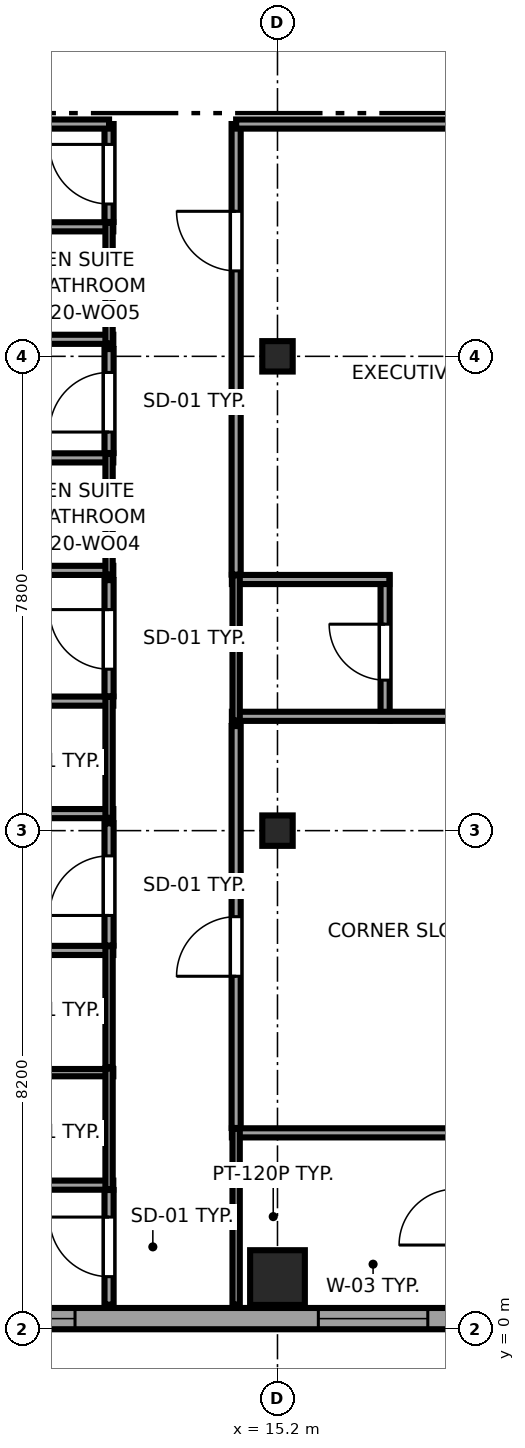
"""IFC4 building model, lengths in metres.
Left out: names, types, materials, properties, quantities, classifications, styles, units other than length and angle.
Written with IfcOpenShell. Run it as: python <this file> out.ifc"""

import sys

from ifc_helpers import new_model, si_unit, direction, frame, frame_2d, origin, origin_2d, place, context, subcontext, project, spatial, rectangle, i_section, extrude, source, transform, mapped, element, fill, save


model = new_model("IFC4")
c1 = context("Model", 3, precision=1e-05, world=origin(), true_north=direction((0.0, 1.0)))
c2 = subcontext(c1, "Body", "Model", "MODEL_VIEW")
j1 = project(units=[si_unit("LENGTHUNIT", "METRE"), si_unit("PLANEANGLEUNIT", "RADIAN")], contexts=[c1])
p1 = place(None, origin())
s1 = spatial("IfcSite", under=j1, at=p1, CompositionType="ELEMENT")
p2 = place(p1, origin())
s2 = spatial("IfcBuilding", under=s1, at=p2, CompositionType="ELEMENT")
p3 = place(p2, frame((0.0, 0.0, 81.7)))
s3 = spatial("IfcBuildingStorey", under=s2, at=p3, CompositionType="ELEMENT", Elevation=81.7)
m1 = source(origin(), c2, "Body", "SweptSolid", [
    extrude(rectangle(XDim=0.9, YDim=0.9, at=origin_2d()), origin(), (0.0, 0.0, 1.0), 3.55),
])
p4 = place(p3, frame((15.2, 0.85, 0.0), z_axis=(0.0, 0.0, 1.0), x_axis=(1.0, 0.0, 0.0)))
e1 = element("IfcColumn", 1, at=p4, inside=s3, PredefinedType="COLUMN", context=c2, shape_type="MappedRepresentation", body=[
    mapped(m1, transform((0.0, 0.0, 0.0), x_axis=(1.0, 0.0, 0.0), y_axis=(0.0, 1.0, 0.0), z_axis=(0.0, 0.0, 1.0), scale=1.0)),
])
m2 = source(origin(), c2, "Body", "SweptSolid", [
    extrude(i_section(OverallWidth=0.5, OverallDepth=0.5, WebThickness=0.022, FlangeThickness=0.034, at=origin_2d()), origin(), (0.0, 0.0, 1.0), 3.55),
])
for number, where, z_axis, x_axis in (
    (2, (15.2, 8.2, 0.0), (0.0, 0.0, 1.0), (1.0, 0.0, 0.0)),
    (3, (15.2, 16.0, 0.0), (0.0, 0.0, 1.0), (1.0, 0.0, 0.0)),
):
    element("IfcColumn", number, at=place(p3, frame(where, z_axis=z_axis, x_axis=x_axis)), inside=s3, PredefinedType="COLUMN", context=c2, shape_type="MappedRepresentation", body=[
        mapped(m2, transform((0.0, 0.0, 0.0), x_axis=(1.0, 0.0, 0.0), y_axis=(0.0, 1.0, 0.0), z_axis=(0.0, 0.0, 1.0), scale=1.0)),
    ])
p5 = place(p3, frame((4.617, 0.175, 0.0), z_axis=(0.0, 0.0, 1.0), x_axis=(1.0, 0.0, 0.0)))
e4 = element("IfcWall", 4, at=p5, inside=s3, PredefinedType="SOLIDWALL", context=c2, shape_type="SweptSolid", body=[
    extrude(rectangle(XDim=18.008, YDim=0.35, at=frame_2d((9.004, 0.0))), origin(), (0.0, 0.0, 1.0), 3.37),
])
p6 = place(p5, frame((5.453, 0.0, 0.68)))
e5 = element("IfcOpeningElement", 5, at=p6, cuts=e4, PredefinedType="OPENING", context=c2, shape_type="SweptSolid", body=[
    extrude(rectangle(XDim=1.8, YDim=1.85, at=frame_2d((0.9, 0.925))), frame((0.0, 0.185, 0.0), z_axis=(0.0, -1.0, 0.0), x_axis=(1.0, 0.0, 0.0)), (0.0, 0.0, 1.0), 0.37),
])
p7 = place(p5, frame((11.255, 0.0, 0.68)))
e6 = element("IfcOpeningElement", 6, at=p7, cuts=e4, PredefinedType="OPENING", context=c2, shape_type="SweptSolid", body=[
    extrude(rectangle(XDim=1.8, YDim=1.85, at=frame_2d((0.9, 0.925))), frame((0.0, 0.185, 0.0), z_axis=(0.0, -1.0, 0.0), x_axis=(1.0, 0.0, 0.0)), (0.0, 0.0, 1.0), 0.37),
])
p8 = place(p5, frame((14.407, 0.0, 0.68)))
e7 = element("IfcOpeningElement", 7, at=p8, cuts=e4, PredefinedType="OPENING", context=c2, shape_type="SweptSolid", body=[
    extrude(rectangle(XDim=1.8, YDim=1.85, at=frame_2d((0.9, 0.925))), frame((0.0, 0.185, 0.0), z_axis=(0.0, -1.0, 0.0), x_axis=(1.0, 0.0, 0.0)), (0.0, 0.0, 1.0), 0.37),
])
p9 = place(p3, frame((9.91, 2.37, 0.0), z_axis=(0.0, 0.0, 1.0), x_axis=(1.0, 0.0, 0.0)))
e8 = element("IfcWall", 8, at=p9, inside=s3, PredefinedType="PARTITIONING", context=c2, shape_type="SweptSolid", body=[
    extrude(rectangle(XDim=2.59, YDim=0.15, at=frame_2d((1.295, 0.0))), origin(), (0.0, 0.0, 1.0), 3.37),
])
p10 = place(p3, frame((9.91, 4.22, 0.0), z_axis=(0.0, 0.0, 1.0), x_axis=(1.0, 0.0, 0.0)))
e9 = element("IfcWall", 9, at=p10, inside=s3, PredefinedType="PLUMBINGWALL", context=c2, shape_type="SweptSolid", body=[
    extrude(rectangle(XDim=2.59, YDim=0.12, at=frame_2d((1.295, 0.0))), origin(), (0.0, 0.0, 1.0), 3.37),
])
p11 = place(p3, frame((12.43, 2.3, 0.0), z_axis=(0.0, 0.0, 1.0), x_axis=(0.0, 1.0, 0.0)))
e10 = element("IfcWall", 10, at=p11, inside=s3, PredefinedType="PLUMBINGWALL", context=c2, shape_type="SweptSolid", body=[
    extrude(rectangle(XDim=1.99, YDim=0.12, at=frame_2d((0.995, 0.0))), origin(), (0.0, 0.0, 1.0), 3.37),
])
p12 = place(p3, frame((9.91, 6.23, 0.0), z_axis=(0.0, 0.0, 1.0), x_axis=(1.0, 0.0, 0.0)))
e11 = element("IfcWall", 11, at=p12, inside=s3, PredefinedType="PARTITIONING", context=c2, shape_type="SweptSolid", body=[
    extrude(rectangle(XDim=2.59, YDim=0.15, at=frame_2d((1.295, 0.0))), origin(), (0.0, 0.0, 1.0), 3.37),
])
p13 = place(p3, frame((12.43, 4.31, 0.0), z_axis=(0.0, 0.0, 1.0), x_axis=(0.0, 1.0, 0.0)))
e12 = element("IfcWall", 12, at=p13, inside=s3, PredefinedType="PLUMBINGWALL", context=c2, shape_type="SweptSolid", body=[
    extrude(rectangle(XDim=1.99, YDim=0.12, at=frame_2d((0.995, 0.0))), origin(), (0.0, 0.0, 1.0), 3.37),
])
p14 = place(p3, frame((0.405, 8.48, 0.0), z_axis=(0.0, 0.0, 1.0), x_axis=(1.0, 0.0, 0.0)))
e13 = element("IfcWall", 13, at=p14, inside=s3, PredefinedType="PARTITIONING", context=c2, shape_type="SweptSolid", body=[
    extrude(rectangle(XDim=12.095, YDim=0.15, at=frame_2d((6.047, 0.0))), origin(), (0.0, 0.0, 1.0), 3.37),
])
p15 = place(p3, frame((9.91, 10.33, 0.0), z_axis=(0.0, 0.0, 1.0), x_axis=(1.0, 0.0, 0.0)))
e14 = element("IfcWall", 14, at=p15, inside=s3, PredefinedType="PARTITIONING", context=c2, shape_type="SweptSolid", body=[
    extrude(rectangle(XDim=2.59, YDim=0.15, at=frame_2d((1.295, 0.0))), origin(), (0.0, 0.0, 1.0), 3.37),
])
p16 = place(p3, frame((12.43, 8.41, 0.0), z_axis=(0.0, 0.0, 1.0), x_axis=(0.0, 1.0, 0.0)))
e15 = element("IfcWall", 15, at=p16, inside=s3, PredefinedType="PLUMBINGWALL", context=c2, shape_type="SweptSolid", body=[
    extrude(rectangle(XDim=1.99, YDim=0.12, at=frame_2d((0.995, 0.0))), origin(), (0.0, 0.0, 1.0), 3.37),
])
p17 = place(p3, frame((0.405, 12.48, 0.0), z_axis=(0.0, 0.0, 1.0), x_axis=(1.0, 0.0, 0.0)))
e16 = element("IfcWall", 16, at=p17, inside=s3, PredefinedType="PARTITIONING", context=c2, shape_type="SweptSolid", body=[
    extrude(rectangle(XDim=12.095, YDim=0.15, at=frame_2d((6.047, 0.0))), origin(), (0.0, 0.0, 1.0), 3.37),
])
p18 = place(p3, frame((9.91, 14.33, 0.0), z_axis=(0.0, 0.0, 1.0), x_axis=(1.0, 0.0, 0.0)))
e17 = element("IfcWall", 17, at=p18, inside=s3, PredefinedType="PARTITIONING", context=c2, shape_type="SweptSolid", body=[
    extrude(rectangle(XDim=2.59, YDim=0.15, at=frame_2d((1.295, 0.0))), origin(), (0.0, 0.0, 1.0), 3.37),
])
p19 = place(p3, frame((12.43, 12.41, 0.0), z_axis=(0.0, 0.0, 1.0), x_axis=(0.0, 1.0, 0.0)))
e18 = element("IfcWall", 18, at=p19, inside=s3, PredefinedType="PLUMBINGWALL", context=c2, shape_type="SweptSolid", body=[
    extrude(rectangle(XDim=1.99, YDim=0.12, at=frame_2d((0.995, 0.0))), origin(), (0.0, 0.0, 1.0), 3.37),
])
p20 = place(p3, frame((0.405, 16.28, 0.0), z_axis=(0.0, 0.0, 1.0), x_axis=(1.0, 0.0, 0.0)))
e19 = element("IfcWall", 19, at=p20, inside=s3, PredefinedType="PARTITIONING", context=c2, shape_type="SweptSolid", body=[
    extrude(rectangle(XDim=12.095, YDim=0.15, at=frame_2d((6.047, 0.0))), origin(), (0.0, 0.0, 1.0), 3.37),
])
p21 = place(p3, frame((9.91, 18.13, 0.0), z_axis=(0.0, 0.0, 1.0), x_axis=(1.0, 0.0, 0.0)))
e20 = element("IfcWall", 20, at=p21, inside=s3, PredefinedType="PARTITIONING", context=c2, shape_type="SweptSolid", body=[
    extrude(rectangle(XDim=2.59, YDim=0.15, at=frame_2d((1.295, 0.0))), origin(), (0.0, 0.0, 1.0), 3.37),
])
p22 = place(p3, frame((12.43, 16.21, 0.0), z_axis=(0.0, 0.0, 1.0), x_axis=(0.0, 1.0, 0.0)))
e21 = element("IfcWall", 21, at=p22, inside=s3, PredefinedType="PLUMBINGWALL", context=c2, shape_type="SweptSolid", body=[
    extrude(rectangle(XDim=1.99, YDim=0.12, at=frame_2d((0.995, 0.0))), origin(), (0.0, 0.0, 1.0), 3.37),
])
p23 = place(p3, frame((14.45, 3.23, 0.0), z_axis=(0.0, 0.0, 1.0), x_axis=(1.0, 0.0, 0.0)))
e22 = element("IfcWall", 22, at=p23, inside=s3, PredefinedType="PARTITIONING", context=c2, shape_type="SweptSolid", body=[
    extrude(rectangle(XDim=3.74, YDim=0.15, at=frame_2d((1.87, 0.0))), origin(), (0.0, 0.0, 1.0), 3.37),
])
p24 = place(p3, frame((14.52, 0.405, 0.0), z_axis=(0.0, 0.0, 1.0), x_axis=(0.0, 1.0, 0.0)))
e23 = element("IfcWall", 23, at=p24, inside=s3, PredefinedType="PLUMBINGWALL", context=c2, shape_type="SweptSolid", body=[
    extrude(rectangle(XDim=2.895, YDim=0.12, at=frame_2d((1.448, 0.0))), origin(), (0.0, 0.0, 1.0), 3.37),
])
p25 = place(p3, frame((16.97, 10.01, 0.0), z_axis=(0.0, 0.0, 1.0), x_axis=(0.0, 1.0, 0.0)))
e24 = element("IfcWall", 24, at=p25, inside=s3, PredefinedType="PARTITIONING", context=c2, shape_type="SweptSolid", body=[
    extrude(rectangle(XDim=2.39, YDim=0.15, at=frame_2d((1.195, 0.0))), origin(), (0.0, 0.0, 1.0), 3.37),
])
p26 = place(p25, frame((0.665, 0.0, 0.0)))
e25 = element("IfcOpeningElement", 25, at=p26, cuts=e24, PredefinedType="OPENING", context=c2, shape_type="SweptSolid", body=[
    extrude(rectangle(XDim=0.92, YDim=2.01, at=frame_2d((0.46, 1.005))), frame((0.0, 0.085, 0.0), z_axis=(0.0, -1.0, 0.0), x_axis=(1.0, 0.0, 0.0)), (0.0, 0.0, 1.0), 0.17),
])
p27 = place(p3, frame((14.45, 10.08, 0.0), z_axis=(0.0, 0.0, 1.0), x_axis=(1.0, 0.0, 0.0)))
e26 = element("IfcWall", 26, at=p27, inside=s3, PredefinedType="PARTITIONING", context=c2, shape_type="SweptSolid", body=[
    extrude(rectangle(XDim=7.9, YDim=0.15, at=frame_2d((3.95, 0.0))), origin(), (0.0, 0.0, 1.0), 3.37),
])
p28 = place(p3, frame((14.45, 12.33, 0.0), z_axis=(0.0, 0.0, 1.0), x_axis=(1.0, 0.0, 0.0)))
e27 = element("IfcWall", 27, at=p28, inside=s3, PredefinedType="PARTITIONING", context=c2, shape_type="SweptSolid", body=[
    extrude(rectangle(XDim=2.59, YDim=0.15, at=frame_2d((1.295, 0.0))), origin(), (0.0, 0.0, 1.0), 3.37),
])
p29 = place(p3, frame((14.52, 10.01, 0.0), z_axis=(0.0, 0.0, 1.0), x_axis=(0.0, 1.0, 0.0)))
e28 = element("IfcWall", 28, at=p29, inside=s3, PredefinedType="PLUMBINGWALL", context=c2, shape_type="SweptSolid", body=[
    extrude(rectangle(XDim=2.39, YDim=0.12, at=frame_2d((1.195, 0.0))), origin(), (0.0, 0.0, 1.0), 3.37),
])
p30 = place(p3, frame((12.43, 0.405, 0.0), z_axis=(0.0, 0.0, 1.0), x_axis=(0.0, 1.0, 0.0)))
e29 = element("IfcWall", 29, at=p30, inside=s3, PredefinedType="PARTITIONING", context=c2, shape_type="SweptSolid", body=[
    extrude(rectangle(XDim=1.885, YDim=0.15, at=frame_2d((0.942, 0.0))), origin(), (0.0, 0.0, 1.0), 3.37),
])
p31 = place(p30, frame((0.46, 0.0, 0.0)))
e30 = element("IfcOpeningElement", 30, at=p31, cuts=e29, PredefinedType="OPENING", context=c2, shape_type="SweptSolid", body=[
    extrude(rectangle(XDim=0.98, YDim=2.12, at=frame_2d((0.49, 1.06))), frame((0.0, 0.085, 0.0), z_axis=(0.0, -1.0, 0.0), x_axis=(1.0, 0.0, 0.0)), (0.0, 0.0, 1.0), 0.17),
])
p32 = place(p3, frame((12.43, 6.31, 0.0), z_axis=(0.0, 0.0, 1.0), x_axis=(0.0, 1.0, 0.0)))
e31 = element("IfcWall", 31, at=p32, inside=s3, PredefinedType="PARTITIONING", context=c2, shape_type="SweptSolid", body=[
    extrude(rectangle(XDim=2.01, YDim=0.15, at=frame_2d((1.005, 0.0))), origin(), (0.0, 0.0, 1.0), 3.37),
])
p33 = place(p32, frame((0.495, 0.0, 0.0)))
e32 = element("IfcOpeningElement", 32, at=p33, cuts=e31, PredefinedType="OPENING", context=c2, shape_type="SweptSolid", body=[
    extrude(rectangle(XDim=0.98, YDim=2.12, at=frame_2d((0.49, 1.06))), frame((0.0, 0.085, 0.0), z_axis=(0.0, -1.0, 0.0), x_axis=(1.0, 0.0, 0.0)), (0.0, 0.0, 1.0), 0.17),
])
p34 = place(p3, frame((12.43, 10.41, 0.0), z_axis=(0.0, 0.0, 1.0), x_axis=(0.0, 1.0, 0.0)))
e33 = element("IfcWall", 33, at=p34, inside=s3, PredefinedType="PARTITIONING", context=c2, shape_type="SweptSolid", body=[
    extrude(rectangle(XDim=1.91, YDim=0.15, at=frame_2d((0.955, 0.0))), origin(), (0.0, 0.0, 1.0), 3.37),
])
p35 = place(p34, frame((0.445, 0.0, 0.0)))
e34 = element("IfcOpeningElement", 34, at=p35, cuts=e33, PredefinedType="OPENING", context=c2, shape_type="SweptSolid", body=[
    extrude(rectangle(XDim=0.98, YDim=2.12, at=frame_2d((0.49, 1.06))), frame((0.0, 0.085, 0.0), z_axis=(0.0, -1.0, 0.0), x_axis=(1.0, 0.0, 0.0)), (0.0, 0.0, 1.0), 0.17),
])
p36 = place(p3, frame((12.43, 14.41, 0.0), z_axis=(0.0, 0.0, 1.0), x_axis=(0.0, 1.0, 0.0)))
e35 = element("IfcWall", 35, at=p36, inside=s3, PredefinedType="PARTITIONING", context=c2, shape_type="SweptSolid", body=[
    extrude(rectangle(XDim=1.71, YDim=0.15, at=frame_2d((0.855, 0.0))), origin(), (0.0, 0.0, 1.0), 3.37),
])
p37 = place(p36, frame((0.345, 0.0, 0.0)))
e36 = element("IfcOpeningElement", 36, at=p37, cuts=e35, PredefinedType="OPENING", context=c2, shape_type="SweptSolid", body=[
    extrude(rectangle(XDim=0.98, YDim=2.12, at=frame_2d((0.49, 1.06))), frame((0.0, 0.085, 0.0), z_axis=(0.0, -1.0, 0.0), x_axis=(1.0, 0.0, 0.0)), (0.0, 0.0, 1.0), 0.17),
])
p38 = place(p3, frame((12.43, 18.21, 0.0), z_axis=(0.0, 0.0, 1.0), x_axis=(0.0, 1.0, 0.0)))
e37 = element("IfcWall", 37, at=p38, inside=s3, PredefinedType="PARTITIONING", context=c2, shape_type="SweptSolid", body=[
    extrude(rectangle(XDim=1.61, YDim=0.15, at=frame_2d((0.805, 0.0))), origin(), (0.0, 0.0, 1.0), 3.37),
])
p39 = place(p38, frame((0.295, 0.0, 0.0)))
e38 = element("IfcOpeningElement", 38, at=p39, cuts=e37, PredefinedType="OPENING", context=c2, shape_type="SweptSolid", body=[
    extrude(rectangle(XDim=0.98, YDim=2.12, at=frame_2d((0.49, 1.06))), frame((0.0, 0.085, 0.0), z_axis=(0.0, -1.0, 0.0), x_axis=(1.0, 0.0, 0.0)), (0.0, 0.0, 1.0), 0.17),
])
p40 = place(p3, frame((0.405, 19.82, 0.0), z_axis=(0.0, 0.0, 1.0), x_axis=(1.0, 0.0, 0.0)))
e39 = element("IfcWall", 39, at=p40, inside=s3, PredefinedType="PARTITIONING", context=c2, shape_type="SweptSolid", body=[
    extrude(rectangle(XDim=12.025, YDim=0.15, at=frame_2d((6.012, 0.0))), origin(), (0.0, 0.0, 1.0), 3.37),
])
p41 = place(p3, frame((14.52, 3.31, 0.0), z_axis=(0.0, 0.0, 1.0), x_axis=(0.0, 1.0, 0.0)))
e40 = element("IfcWall", 40, at=p41, inside=s3, PredefinedType="PARTITIONING", context=c2, shape_type="SweptSolid", body=[
    extrude(rectangle(XDim=6.61, YDim=0.15, at=frame_2d((3.305, 0.0))), origin(), (0.0, 0.0, 1.0), 3.37),
])
p42 = place(p41, frame((2.495, 0.0, 0.0)))
e41 = element("IfcOpeningElement", 41, at=p42, cuts=e40, PredefinedType="OPENING", context=c2, shape_type="SweptSolid", body=[
    extrude(rectangle(XDim=0.98, YDim=2.12, at=frame_2d((0.49, 1.06))), frame((0.0, 0.085, 0.0), z_axis=(0.0, -1.0, 0.0), x_axis=(1.0, 0.0, 0.0)), (0.0, 0.0, 1.0), 0.17),
])
p43 = place(p3, frame((14.52, 12.41, 0.0), z_axis=(0.0, 0.0, 1.0), x_axis=(0.0, 1.0, 0.0)))
e42 = element("IfcWall", 42, at=p43, inside=s3, PredefinedType="PARTITIONING", context=c2, shape_type="SweptSolid", body=[
    extrude(rectangle(XDim=7.41, YDim=0.15, at=frame_2d((3.705, 0.0))), origin(), (0.0, 0.0, 1.0), 3.37),
])
p44 = place(p43, frame((4.995, 0.0, 0.0)))
e43 = element("IfcOpeningElement", 43, at=p44, cuts=e42, PredefinedType="OPENING", context=c2, shape_type="SweptSolid", body=[
    extrude(rectangle(XDim=0.98, YDim=2.12, at=frame_2d((0.49, 1.06))), frame((0.0, 0.085, 0.0), z_axis=(0.0, -1.0, 0.0), x_axis=(1.0, 0.0, 0.0)), (0.0, 0.0, 1.0), 0.17),
])
p45 = place(p3, frame((14.52, 19.82, 0.0), z_axis=(0.0, 0.0, 1.0), x_axis=(1.0, 0.0, 0.0)))
e44 = element("IfcWall", 44, at=p45, inside=s3, PredefinedType="PARTITIONING", context=c2, shape_type="SweptSolid", body=[
    extrude(rectangle(XDim=7.83, YDim=0.15, at=frame_2d((3.915, 0.0))), origin(), (0.0, 0.0, 1.0), 3.37),
])
m3 = source(origin(), c2, "Body", "SweptSolid", [
    extrude(rectangle(XDim=1.8, YDim=1.85, at=frame_2d((0.9, 0.925))), frame((0.0, 0.09, 0.0), z_axis=(0.0, -1.0, 0.0), x_axis=(1.0, 0.0, 0.0)), (0.0, 0.0, 1.0), 0.06),
])
p46 = place(p6, origin())
e45 = element("IfcWindow", 45, at=p46, inside=s3, PartitioningType="TRIPLE_PANEL_HORIZONTAL", PredefinedType="WINDOW", context=c2, shape_type="MappedRepresentation", body=[
    mapped(m3, transform((0.0, 0.0, 0.0), x_axis=(1.0, 0.0, 0.0), y_axis=(0.0, 1.0, 0.0), z_axis=(0.0, 0.0, 1.0), scale=1.0)),
])
fill(e5, e45)
p47 = place(p7, origin())
e46 = element("IfcWindow", 46, at=p47, inside=s3, PartitioningType="TRIPLE_PANEL_HORIZONTAL", PredefinedType="WINDOW", context=c2, shape_type="MappedRepresentation", body=[
    mapped(m3, transform((0.0, 0.0, 0.0), x_axis=(1.0, 0.0, 0.0), y_axis=(0.0, 1.0, 0.0), z_axis=(0.0, 0.0, 1.0), scale=1.0)),
])
fill(e6, e46)
m4 = source(origin(), c2, "Body", "SweptSolid", [
    extrude(rectangle(XDim=0.92, YDim=2.01, at=frame_2d((0.46, 1.005))), frame((0.0, 0.025, 0.0), z_axis=(0.0, -1.0, 0.0), x_axis=(1.0, 0.0, 0.0)), (0.0, 0.0, 1.0), 0.05),
])
p48 = place(p26, origin())
e47 = element("IfcDoor", 47, at=p48, inside=s3, OperationType="SINGLE_SWING_RIGHT", PredefinedType="DOOR", context=c2, shape_type="MappedRepresentation", body=[
    mapped(m4, transform((0.0, 0.0, 0.0), x_axis=(1.0, 0.0, 0.0), y_axis=(0.0, 1.0, 0.0), z_axis=(0.0, 0.0, 1.0), scale=1.0)),
])
fill(e25, e47)
m5 = source(origin(), c2, "Body", "SweptSolid", [
    extrude(rectangle(XDim=0.98, YDim=2.12, at=frame_2d((0.49, 1.06))), frame((0.0, 0.025, 0.0), z_axis=(0.0, -1.0, 0.0), x_axis=(1.0, 0.0, 0.0)), (0.0, 0.0, 1.0), 0.05),
])
p49 = place(p31, origin())
e48 = element("IfcDoor", 48, at=p49, inside=s3, OperationType="SINGLE_SWING_RIGHT", PredefinedType="DOOR", context=c2, shape_type="MappedRepresentation", body=[
    mapped(m5, transform((0.0, 0.0, 0.0), x_axis=(1.0, 0.0, 0.0), y_axis=(0.0, 1.0, 0.0), z_axis=(0.0, 0.0, 1.0), scale=1.0)),
])
fill(e30, e48)
p50 = place(p33, origin())
e49 = element("IfcDoor", 49, at=p50, inside=s3, OperationType="SINGLE_SWING_LEFT", PredefinedType="DOOR", context=c2, shape_type="MappedRepresentation", body=[
    mapped(m5, transform((0.0, 0.0, 0.0), x_axis=(1.0, 0.0, 0.0), y_axis=(0.0, 1.0, 0.0), z_axis=(0.0, 0.0, 1.0), scale=1.0)),
])
fill(e32, e49)
p51 = place(p35, origin())
e50 = element("IfcDoor", 50, at=p51, inside=s3, OperationType="SINGLE_SWING_RIGHT", PredefinedType="DOOR", context=c2, shape_type="MappedRepresentation", body=[
    mapped(m5, transform((0.0, 0.0, 0.0), x_axis=(1.0, 0.0, 0.0), y_axis=(0.0, 1.0, 0.0), z_axis=(0.0, 0.0, 1.0), scale=1.0)),
])
fill(e34, e50)
p52 = place(p37, origin())
e51 = element("IfcDoor", 51, at=p52, inside=s3, OperationType="SINGLE_SWING_LEFT", PredefinedType="DOOR", context=c2, shape_type="MappedRepresentation", body=[
    mapped(m5, transform((0.0, 0.0, 0.0), x_axis=(1.0, 0.0, 0.0), y_axis=(0.0, 1.0, 0.0), z_axis=(0.0, 0.0, 1.0), scale=1.0)),
])
fill(e36, e51)
p53 = place(p39, origin())
e52 = element("IfcDoor", 52, at=p53, inside=s3, OperationType="SINGLE_SWING_RIGHT", PredefinedType="DOOR", context=c2, shape_type="MappedRepresentation", body=[
    mapped(m5, transform((0.0, 0.0, 0.0), x_axis=(1.0, 0.0, 0.0), y_axis=(0.0, 1.0, 0.0), z_axis=(0.0, 0.0, 1.0), scale=1.0)),
])
fill(e38, e52)
p54 = place(p42, origin())
e53 = element("IfcDoor", 53, at=p54, inside=s3, OperationType="SINGLE_SWING_LEFT", PredefinedType="DOOR", context=c2, shape_type="MappedRepresentation", body=[
    mapped(m5, transform((0.0, 0.0, 0.0), x_axis=(1.0, 0.0, 0.0), y_axis=(0.0, 1.0, 0.0), z_axis=(0.0, 0.0, 1.0), scale=1.0)),
])
fill(e41, e53)
p55 = place(p44, origin())
e54 = element("IfcDoor", 54, at=p55, inside=s3, OperationType="SINGLE_SWING_RIGHT", PredefinedType="DOOR", context=c2, shape_type="MappedRepresentation", body=[
    mapped(m5, transform((0.0, 0.0, 0.0), x_axis=(1.0, 0.0, 0.0), y_axis=(0.0, 1.0, 0.0), z_axis=(0.0, 0.0, 1.0), scale=1.0)),
])
fill(e43, e54)
save(model, sys.argv[1])
